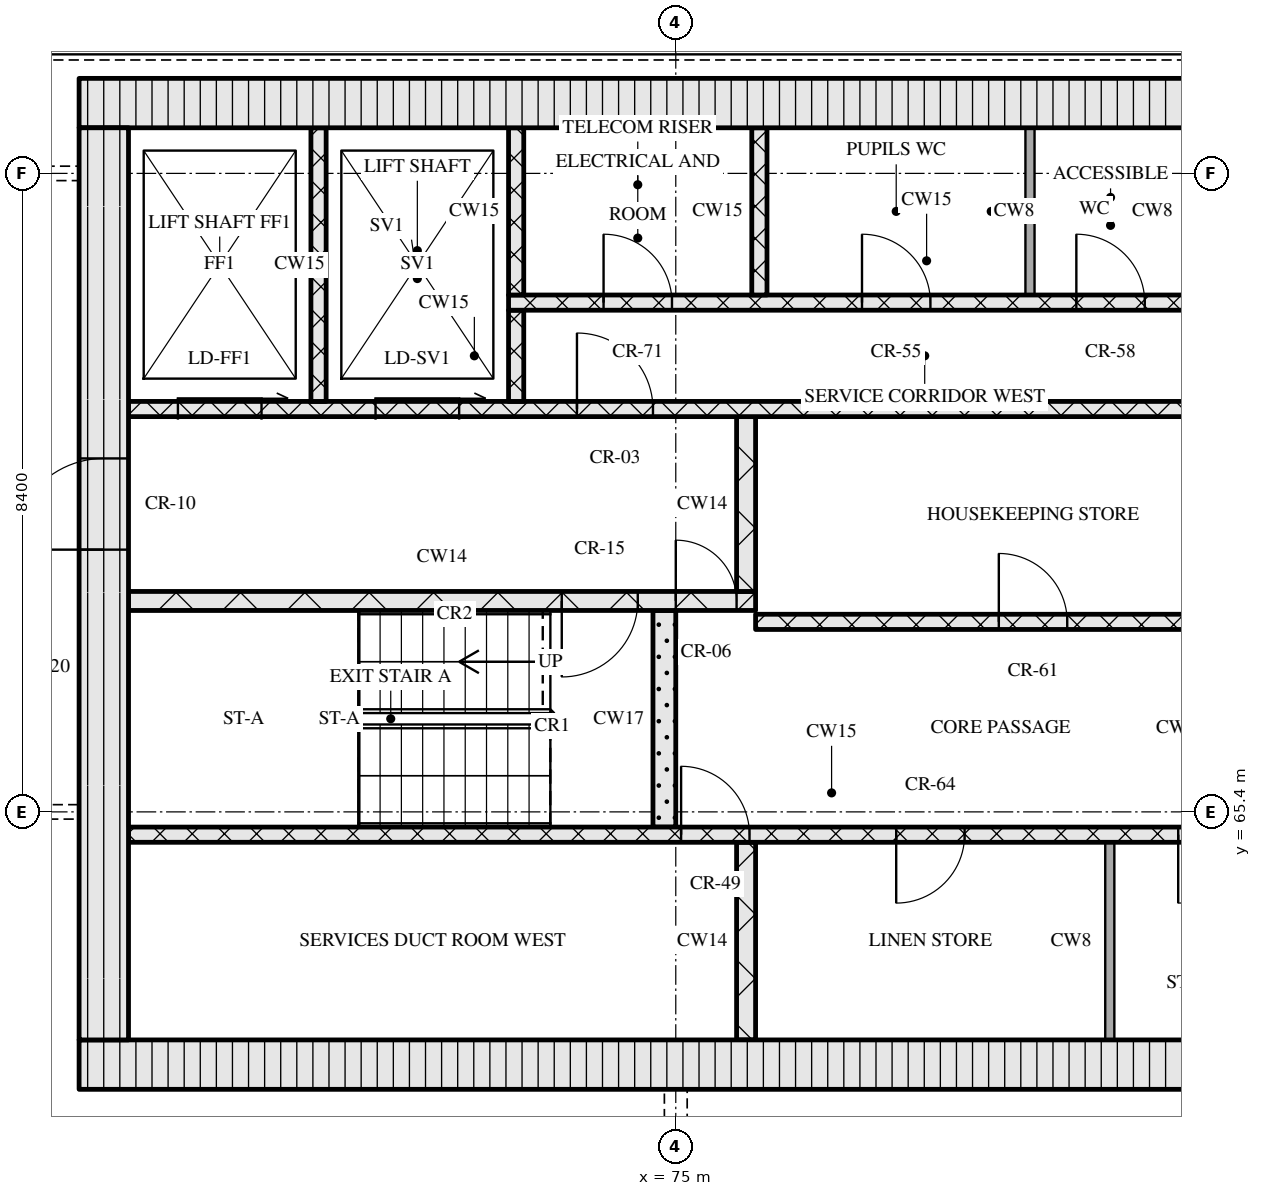
"""IFC4 building model, lengths in metres.
Left out: names, types, materials, properties, quantities, classifications, styles, units other than length and angle.
Written with IfcOpenShell. Run it as: python <this file> out.ifc"""

import sys

from ifc_helpers import new_model, si_unit, direction, frame, frame_2d, origin, place, context, subcontext, project, spatial, rectangle, extrude, element, fill, save


model = new_model("IFC4")
c1 = context("Model", 3, precision=1e-05, world=origin(), true_north=direction((0.0, 1.0)))
c2 = subcontext(c1, "Body", "Model", "MODEL_VIEW")
j1 = project(units=[si_unit("LENGTHUNIT", "METRE"), si_unit("PLANEANGLEUNIT", "RADIAN")], contexts=[c1])
p1 = place(None, origin())
s1 = spatial("IfcSite", under=j1, at=p1, CompositionType="ELEMENT")
p2 = place(p1, origin())
s2 = spatial("IfcBuilding", under=s1, at=p2, CompositionType="ELEMENT")
p3 = place(p2, frame((0.0, 0.0, 216.3)))
s3 = spatial("IfcBuildingStorey", under=s2, at=p3, CompositionType="ELEMENT", Elevation=216.3)
p4 = place(p3, frame((67.15, 62.075, 0.0), z_axis=(0.0, 0.0, 1.0), x_axis=(1.0, 0.0, 0.0)))
e1 = element("IfcWall", 1, at=p4, inside=s3, PredefinedType="SOLIDWALL", context=c2, shape_type="SweptSolid", body=[
    extrude(rectangle(XDim=40.9, YDim=0.65, at=frame_2d((20.45, 0.0))), origin(), (0.0, 0.0, 1.0), 3.32),
])
p5 = place(p4, frame((20.8, 0.0, 0.0)))
e2 = element("IfcOpeningElement", 2, at=p5, cuts=e1, PredefinedType="OPENING", context=c2, shape_type="SweptSolid", body=[
    extrude(rectangle(XDim=1.8, YDim=2.1, at=frame_2d((0.9, 1.05))), frame((0.0, 0.335, 0.0), z_axis=(0.0, -1.0, 0.0), x_axis=(1.0, 0.0, 0.0)), (0.0, 0.0, 1.0), 0.67),
])
p6 = place(p3, frame((67.15, 74.725, 0.0), z_axis=(0.0, 0.0, 1.0), x_axis=(1.0, 0.0, 0.0)))
e3 = element("IfcWall", 3, at=p6, inside=s3, PredefinedType="SOLIDWALL", context=c2, shape_type="SweptSolid", body=[
    extrude(rectangle(XDim=40.9, YDim=0.65, at=frame_2d((20.45, 0.0))), origin(), (0.0, 0.0, 1.0), 3.32),
])
p7 = place(p3, frame((67.475, 62.4, 0.0), z_axis=(0.0, 0.0, 1.0), x_axis=(0.0, 1.0, 0.0)))
e4 = element("IfcWall", 4, at=p7, inside=s3, PredefinedType="SOLIDWALL", context=c2, shape_type="SweptSolid", body=[
    extrude(rectangle(XDim=12.0, YDim=0.65, at=frame_2d((6.0, 0.0))), origin(), (0.0, 0.0, 1.0), 3.32),
])
p8 = place(p7, frame((6.45, 0.0, 0.0)))
e5 = element("IfcOpeningElement", 5, at=p8, cuts=e4, PredefinedType="OPENING", context=c2, shape_type="SweptSolid", body=[
    extrude(rectangle(XDim=1.2, YDim=2.1, at=frame_2d((0.6, 1.05))), frame((0.0, 0.335, 0.0), z_axis=(0.0, -1.0, 0.0), x_axis=(1.0, 0.0, 0.0)), (0.0, 0.0, 1.0), 0.67),
])
p9 = place(p3, frame((75.925, 62.4, 0.0), z_axis=(0.0, 0.0, 1.0), x_axis=(0.0, 1.0, 0.0)))
e6 = element("IfcWall", 6, at=p9, inside=s3, PredefinedType="SOLIDWALL", context=c2, shape_type="SweptSolid", body=[
    extrude(rectangle(XDim=2.6, YDim=0.25, at=frame_2d((1.3, 0.0))), origin(), (0.0, 0.0, 1.0), 3.32),
])
p10 = place(p3, frame((80.71, 62.4, 0.0), z_axis=(0.0, 0.0, 1.0), x_axis=(0.0, 1.0, 0.0)))
e7 = element("IfcWall", 7, at=p10, inside=s3, PredefinedType="PARTITIONING", context=c2, shape_type="SweptSolid", body=[
    extrude(rectangle(XDim=2.6, YDim=0.12, at=frame_2d((1.3, 0.0))), origin(), (0.0, 0.0, 1.0), 3.32),
])
p11 = place(p3, frame((67.8, 65.1, 0.0), z_axis=(0.0, 0.0, 1.0), x_axis=(1.0, 0.0, 0.0)))
e8 = element("IfcWall", 8, at=p11, inside=s3, PredefinedType="SOLIDWALL", context=c2, shape_type="SweptSolid", body=[
    extrude(rectangle(XDim=18.5, YDim=0.2, at=frame_2d((9.25, 0.0))), origin(), (0.0, 0.0, 1.0), 3.32),
])
p12 = place(p11, frame((7.27, 0.0, 0.0)))
e9 = element("IfcOpeningElement", 9, at=p12, cuts=e8, PredefinedType="OPENING", context=c2, shape_type="SweptSolid", body=[
    extrude(rectangle(XDim=0.9, YDim=2.1, at=frame_2d((0.45, 1.05))), frame((0.0, 0.11, 0.0), z_axis=(0.0, -1.0, 0.0), x_axis=(1.0, 0.0, 0.0)), (0.0, 0.0, 1.0), 0.22),
])
p13 = place(p11, frame((10.1, 0.0, 0.0)))
e10 = element("IfcOpeningElement", 10, at=p13, cuts=e8, PredefinedType="OPENING", context=c2, shape_type="SweptSolid", body=[
    extrude(rectangle(XDim=0.9, YDim=2.1, at=frame_2d((0.45, 1.05))), frame((0.0, 0.11, 0.0), z_axis=(0.0, -1.0, 0.0), x_axis=(1.0, 0.0, 0.0)), (0.0, 0.0, 1.0), 0.22),
])
p14 = place(p11, frame((13.81, 0.0, 0.0)))
e11 = element("IfcOpeningElement", 11, at=p14, cuts=e8, PredefinedType="OPENING", context=c2, shape_type="SweptSolid", body=[
    extrude(rectangle(XDim=0.9, YDim=2.1, at=frame_2d((0.45, 1.05))), frame((0.0, 0.11, 0.0), z_axis=(0.0, -1.0, 0.0), x_axis=(1.0, 0.0, 0.0)), (0.0, 0.0, 1.0), 0.22),
])
p15 = place(p11, frame((16.7, 0.0, 0.0)))
e12 = element("IfcOpeningElement", 12, at=p15, cuts=e8, PredefinedType="OPENING", context=c2, shape_type="SweptSolid", body=[
    extrude(rectangle(XDim=0.9, YDim=2.1, at=frame_2d((0.45, 1.05))), frame((0.0, 0.11, 0.0), z_axis=(0.0, -1.0, 0.0), x_axis=(1.0, 0.0, 0.0)), (0.0, 0.0, 1.0), 0.22),
])
p16 = place(p3, frame((74.85, 65.2, 0.0), z_axis=(0.0, 0.0, 1.0), x_axis=(0.0, 1.0, 0.0)))
e13 = element("IfcWall", 13, at=p16, inside=s3, PredefinedType="SOLIDWALL", context=c2, shape_type="SweptSolid", body=[
    extrude(rectangle(XDim=2.85, YDim=0.3, at=frame_2d((1.425, 0.0))), origin(), (0.0, 0.0, 1.0), 3.32),
])
p17 = place(p3, frame((76.05, 67.9, 0.0), z_axis=(0.0, 0.0, 1.0), x_axis=(1.0, 0.0, 0.0)))
e14 = element("IfcWall", 14, at=p17, inside=s3, PredefinedType="SOLIDWALL", context=c2, shape_type="SweptSolid", body=[
    extrude(rectangle(XDim=23.1, YDim=0.2, at=frame_2d((11.55, 0.0))), origin(), (0.0, 0.0, 1.0), 3.32),
])
p18 = place(p17, frame((3.2, 0.0, 0.0)))
e15 = element("IfcOpeningElement", 15, at=p18, cuts=e14, PredefinedType="OPENING", context=c2, shape_type="SweptSolid", body=[
    extrude(rectangle(XDim=0.9, YDim=2.1, at=frame_2d((0.45, 1.05))), frame((0.0, 0.11, 0.0), z_axis=(0.0, -1.0, 0.0), x_axis=(1.0, 0.0, 0.0)), (0.0, 0.0, 1.0), 0.22),
])
p19 = place(p17, frame((9.7, 0.0, 0.0)))
e16 = element("IfcOpeningElement", 16, at=p19, cuts=e14, PredefinedType="OPENING", context=c2, shape_type="SweptSolid", body=[
    extrude(rectangle(XDim=0.9, YDim=2.1, at=frame_2d((0.45, 1.05))), frame((0.0, 0.11, 0.0), z_axis=(0.0, -1.0, 0.0), x_axis=(1.0, 0.0, 0.0)), (0.0, 0.0, 1.0), 0.22),
])
p20 = place(p17, frame((13.55, 0.0, 0.0)))
e17 = element("IfcOpeningElement", 17, at=p20, cuts=e14, PredefinedType="OPENING", context=c2, shape_type="SweptSolid", body=[
    extrude(rectangle(XDim=1.0, YDim=2.1, at=frame_2d((0.5, 1.05))), frame((0.0, 0.11, 0.0), z_axis=(0.0, -1.0, 0.0), x_axis=(1.0, 0.0, 0.0)), (0.0, 0.0, 1.0), 0.22),
])
p21 = place(p17, frame((16.2, 0.0, 0.0)))
e18 = element("IfcOpeningElement", 18, at=p21, cuts=e14, PredefinedType="OPENING", context=c2, shape_type="SweptSolid", body=[
    extrude(rectangle(XDim=1.1, YDim=2.1, at=frame_2d((0.55, 1.05))), frame((0.0, 0.11, 0.0), z_axis=(0.0, -1.0, 0.0), x_axis=(1.0, 0.0, 0.0)), (0.0, 0.0, 1.0), 0.22),
])
p22 = place(p17, frame((18.7, 0.0, 0.0)))
e19 = element("IfcOpeningElement", 19, at=p22, cuts=e14, PredefinedType="OPENING", context=c2, shape_type="SweptSolid", body=[
    extrude(rectangle(XDim=1.1, YDim=2.1, at=frame_2d((0.55, 1.05))), frame((0.0, 0.11, 0.0), z_axis=(0.0, -1.0, 0.0), x_axis=(1.0, 0.0, 0.0)), (0.0, 0.0, 1.0), 0.22),
])
p23 = place(p17, frame((21.2, 0.0, 0.0)))
e20 = element("IfcOpeningElement", 20, at=p23, cuts=e14, PredefinedType="OPENING", context=c2, shape_type="SweptSolid", body=[
    extrude(rectangle(XDim=1.1, YDim=2.1, at=frame_2d((0.55, 1.05))), frame((0.0, 0.11, 0.0), z_axis=(0.0, -1.0, 0.0), x_axis=(1.0, 0.0, 0.0)), (0.0, 0.0, 1.0), 0.22),
])
p24 = place(p3, frame((67.8, 68.175, 0.0), z_axis=(0.0, 0.0, 1.0), x_axis=(1.0, 0.0, 0.0)))
e21 = element("IfcWall", 21, at=p24, inside=s3, PredefinedType="SOLIDWALL", context=c2, shape_type="SweptSolid", body=[
    extrude(rectangle(XDim=8.25, YDim=0.25, at=frame_2d((4.125, 0.0))), origin(), (0.0, 0.0, 1.0), 3.32),
])
p25 = place(p24, frame((5.7, 0.0, 0.0)))
e22 = element("IfcOpeningElement", 22, at=p25, cuts=e21, PredefinedType="OPENING", context=c2, shape_type="SweptSolid", body=[
    extrude(rectangle(XDim=1.0, YDim=2.1, at=frame_2d((0.5, 1.05))), frame((0.0, 0.135, 0.0), z_axis=(0.0, -1.0, 0.0), x_axis=(1.0, 0.0, 0.0)), (0.0, 0.0, 1.0), 0.27),
])
p26 = place(p24, frame((7.2, 0.0, 0.0)))
e23 = element("IfcOpeningElement", 23, at=p26, cuts=e21, PredefinedType="OPENING", context=c2, shape_type="SweptSolid", body=[
    extrude(rectangle(XDim=0.8, YDim=2.1, at=frame_2d((0.4, 1.05))), frame((0.0, 0.135, 0.0), z_axis=(0.0, -1.0, 0.0), x_axis=(1.0, 0.0, 0.0)), (0.0, 0.0, 1.0), 0.27),
])
p27 = place(p3, frame((75.925, 68.3, 0.0), z_axis=(0.0, 0.0, 1.0), x_axis=(0.0, 1.0, 0.0)))
e24 = element("IfcWall", 24, at=p27, inside=s3, PredefinedType="SOLIDWALL", context=c2, shape_type="SweptSolid", body=[
    extrude(rectangle(XDim=2.3, YDim=0.25, at=frame_2d((1.15, 0.0))), origin(), (0.0, 0.0, 1.0), 3.32),
])
p28 = place(p3, frame((67.8, 70.7, 0.0), z_axis=(0.0, 0.0, 1.0), x_axis=(1.0, 0.0, 0.0)))
e25 = element("IfcWall", 25, at=p28, inside=s3, PredefinedType="SOLIDWALL", context=c2, shape_type="SweptSolid", body=[
    extrude(rectangle(XDim=39.6, YDim=0.2, at=frame_2d((19.8, 0.0))), origin(), (0.0, 0.0, 1.0), 3.32),
])
p29 = place(p28, frame((0.65, 0.0, 0.0)))
e26 = element("IfcOpeningElement", 26, at=p29, cuts=e25, PredefinedType="OPENING", context=c2, shape_type="SweptSolid", body=[
    extrude(rectangle(XDim=1.1, YDim=2.1, at=frame_2d((0.55, 1.05))), frame((0.0, 0.11, 0.0), z_axis=(0.0, -1.0, 0.0), x_axis=(1.0, 0.0, 0.0)), (0.0, 0.0, 1.0), 0.22),
])
p30 = place(p28, frame((3.25, 0.0, 0.0)))
e27 = element("IfcOpeningElement", 27, at=p30, cuts=e25, PredefinedType="OPENING", context=c2, shape_type="SweptSolid", body=[
    extrude(rectangle(XDim=1.1, YDim=2.1, at=frame_2d((0.55, 1.05))), frame((0.0, 0.11, 0.0), z_axis=(0.0, -1.0, 0.0), x_axis=(1.0, 0.0, 0.0)), (0.0, 0.0, 1.0), 0.22),
])
p31 = place(p28, frame((5.9, 0.0, 0.0)))
e28 = element("IfcOpeningElement", 28, at=p31, cuts=e25, PredefinedType="OPENING", context=c2, shape_type="SweptSolid", body=[
    extrude(rectangle(XDim=1.0, YDim=2.1, at=frame_2d((0.5, 1.05))), frame((0.0, 0.11, 0.0), z_axis=(0.0, -1.0, 0.0), x_axis=(1.0, 0.0, 0.0)), (0.0, 0.0, 1.0), 0.22),
])
p32 = place(p28, frame((21.7, 0.0, 0.0)))
e29 = element("IfcOpeningElement", 29, at=p32, cuts=e25, PredefinedType="OPENING", context=c2, shape_type="SweptSolid", body=[
    extrude(rectangle(XDim=1.0, YDim=2.1, at=frame_2d((0.5, 1.05))), frame((0.0, 0.11, 0.0), z_axis=(0.0, -1.0, 0.0), x_axis=(1.0, 0.0, 0.0)), (0.0, 0.0, 1.0), 0.22),
])
p33 = place(p28, frame((32.7, 0.0, 0.0)))
e30 = element("IfcOpeningElement", 30, at=p33, cuts=e25, PredefinedType="OPENING", context=c2, shape_type="SweptSolid", body=[
    extrude(rectangle(XDim=1.0, YDim=2.1, at=frame_2d((0.5, 1.05))), frame((0.0, 0.11, 0.0), z_axis=(0.0, -1.0, 0.0), x_axis=(1.0, 0.0, 0.0)), (0.0, 0.0, 1.0), 0.22),
])
p34 = place(p28, frame((35.25, 0.0, 0.0)))
e31 = element("IfcOpeningElement", 31, at=p34, cuts=e25, PredefinedType="OPENING", context=c2, shape_type="SweptSolid", body=[
    extrude(rectangle(XDim=1.1, YDim=2.1, at=frame_2d((0.55, 1.05))), frame((0.0, 0.11, 0.0), z_axis=(0.0, -1.0, 0.0), x_axis=(1.0, 0.0, 0.0)), (0.0, 0.0, 1.0), 0.22),
])
p35 = place(p28, frame((37.85, 0.0, 0.0)))
e32 = element("IfcOpeningElement", 32, at=p35, cuts=e25, PredefinedType="OPENING", context=c2, shape_type="SweptSolid", body=[
    extrude(rectangle(XDim=1.1, YDim=2.1, at=frame_2d((0.55, 1.05))), frame((0.0, 0.11, 0.0), z_axis=(0.0, -1.0, 0.0), x_axis=(1.0, 0.0, 0.0)), (0.0, 0.0, 1.0), 0.22),
])
p36 = place(p3, frame((70.3, 70.8, 0.0), z_axis=(0.0, 0.0, 1.0), x_axis=(0.0, 1.0, 0.0)))
e33 = element("IfcWall", 33, at=p36, inside=s3, PredefinedType="SOLIDWALL", context=c2, shape_type="SweptSolid", body=[
    extrude(rectangle(XDim=3.6, YDim=0.2, at=frame_2d((1.8, 0.0))), origin(), (0.0, 0.0, 1.0), 3.32),
])
p37 = place(p3, frame((72.9, 70.8, 0.0), z_axis=(0.0, 0.0, 1.0), x_axis=(0.0, 1.0, 0.0)))
e34 = element("IfcWall", 34, at=p37, inside=s3, PredefinedType="SOLIDWALL", context=c2, shape_type="SweptSolid", body=[
    extrude(rectangle(XDim=1.2, YDim=0.2, at=frame_2d((0.6, 0.0))), origin(), (0.0, 0.0, 1.0), 3.32),
])
p38 = place(p3, frame((72.8, 72.1, 0.0), z_axis=(0.0, 0.0, 1.0), x_axis=(1.0, 0.0, 0.0)))
e35 = element("IfcWall", 35, at=p38, inside=s3, PredefinedType="SOLIDWALL", context=c2, shape_type="SweptSolid", body=[
    extrude(rectangle(XDim=11.0, YDim=0.2, at=frame_2d((5.5, 0.0))), origin(), (0.0, 0.0, 1.0), 3.32),
])
p39 = place(p38, frame((1.25, 0.0, 0.0)))
e36 = element("IfcOpeningElement", 36, at=p39, cuts=e35, PredefinedType="OPENING", context=c2, shape_type="SweptSolid", body=[
    extrude(rectangle(XDim=0.9, YDim=2.1, at=frame_2d((0.45, 1.05))), frame((0.0, 0.11, 0.0), z_axis=(0.0, -1.0, 0.0), x_axis=(1.0, 0.0, 0.0)), (0.0, 0.0, 1.0), 0.22),
])
p40 = place(p38, frame((4.65, 0.0, 0.0)))
e37 = element("IfcOpeningElement", 37, at=p40, cuts=e35, PredefinedType="OPENING", context=c2, shape_type="SweptSolid", body=[
    extrude(rectangle(XDim=0.9, YDim=2.1, at=frame_2d((0.45, 1.05))), frame((0.0, 0.11, 0.0), z_axis=(0.0, -1.0, 0.0), x_axis=(1.0, 0.0, 0.0)), (0.0, 0.0, 1.0), 0.22),
])
p41 = place(p38, frame((7.47, 0.0, 0.0)))
e38 = element("IfcOpeningElement", 38, at=p41, cuts=e35, PredefinedType="OPENING", context=c2, shape_type="SweptSolid", body=[
    extrude(rectangle(XDim=0.9, YDim=2.1, at=frame_2d((0.45, 1.05))), frame((0.0, 0.11, 0.0), z_axis=(0.0, -1.0, 0.0), x_axis=(1.0, 0.0, 0.0)), (0.0, 0.0, 1.0), 0.22),
])
p42 = place(p38, frame((9.445, 0.0, 0.0)))
e39 = element("IfcOpeningElement", 39, at=p42, cuts=e35, PredefinedType="OPENING", context=c2, shape_type="SweptSolid", body=[
    extrude(rectangle(XDim=0.9, YDim=2.1, at=frame_2d((0.45, 1.05))), frame((0.0, 0.11, 0.0), z_axis=(0.0, -1.0, 0.0), x_axis=(1.0, 0.0, 0.0)), (0.0, 0.0, 1.0), 0.22),
])
for number, where, z_axis, x_axis in (
    (40, (72.9, 72.2, 0.0), (0.0, 0.0, 1.0), (0.0, 1.0, 0.0)),
    (41, (76.1, 72.2, 0.0), (0.0, 0.0, 1.0), (0.0, 1.0, 0.0)),
):
    element("IfcWall", number, at=place(p3, frame(where, z_axis=z_axis, x_axis=x_axis)), inside=s3, PredefinedType="SOLIDWALL", context=c2, shape_type="SweptSolid", body=[
        extrude(rectangle(XDim=2.2, YDim=0.2, at=frame_2d((1.1, 0.0))), origin(), (0.0, 0.0, 1.0), 3.32),
    ])
p43 = place(p3, frame((79.66, 72.2, 0.0), z_axis=(0.0, 0.0, 1.0), x_axis=(0.0, 1.0, 0.0)))
e42 = element("IfcWall", 42, at=p43, inside=s3, PredefinedType="PARTITIONING", context=c2, shape_type="SweptSolid", body=[
    extrude(rectangle(XDim=2.2, YDim=0.12, at=frame_2d((1.1, 0.0))), origin(), (0.0, 0.0, 1.0), 3.32),
])
p44 = place(p12, origin())
e43 = element("IfcDoor", 43, at=p44, inside=s3, OperationType="SINGLE_SWING_LEFT", PredefinedType="DOOR", context=c2, shape_type="SweptSolid", body=[
    extrude(rectangle(XDim=0.9, YDim=2.1, at=frame_2d((0.45, 1.05))), frame((0.0, 0.025, 0.0), z_axis=(0.0, -1.0, 0.0), x_axis=(1.0, 0.0, 0.0)), (0.0, 0.0, 1.0), 0.05),
])
fill(e9, e43)
p45 = place(p13, origin())
e44 = element("IfcDoor", 44, at=p45, inside=s3, OperationType="SINGLE_SWING_RIGHT", PredefinedType="DOOR", context=c2, shape_type="SweptSolid", body=[
    extrude(rectangle(XDim=0.9, YDim=2.1, at=frame_2d((0.45, 1.05))), frame((0.0, 0.025, 0.0), z_axis=(0.0, -1.0, 0.0), x_axis=(1.0, 0.0, 0.0)), (0.0, 0.0, 1.0), 0.05),
])
fill(e10, e44)
p46 = place(p14, origin())
e45 = element("IfcDoor", 45, at=p46, inside=s3, OperationType="SINGLE_SWING_RIGHT", PredefinedType="DOOR", context=c2, shape_type="SweptSolid", body=[
    extrude(rectangle(XDim=0.9, YDim=2.1, at=frame_2d((0.45, 1.05))), frame((0.0, 0.025, 0.0), z_axis=(0.0, -1.0, 0.0), x_axis=(1.0, 0.0, 0.0)), (0.0, 0.0, 1.0), 0.05),
])
fill(e11, e45)
p47 = place(p18, origin())
e46 = element("IfcDoor", 46, at=p47, inside=s3, OperationType="SINGLE_SWING_LEFT", PredefinedType="DOOR", context=c2, shape_type="SweptSolid", body=[
    extrude(rectangle(XDim=0.9, YDim=2.1, at=frame_2d((0.45, 1.05))), frame((0.0, 0.025, 0.0), z_axis=(0.0, -1.0, 0.0), x_axis=(1.0, 0.0, 0.0)), (0.0, 0.0, 1.0), 0.05),
])
fill(e15, e46)
p48 = place(p25, origin())
e47 = element("IfcDoor", 47, at=p48, inside=s3, OperationType="SINGLE_SWING_RIGHT", PredefinedType="DOOR", context=c2, shape_type="SweptSolid", body=[
    extrude(rectangle(XDim=1.0, YDim=2.1, at=frame_2d((0.5, 1.05))), frame((0.0, 0.025, 0.0), z_axis=(0.0, -1.0, 0.0), x_axis=(1.0, 0.0, 0.0)), (0.0, 0.0, 1.0), 0.05),
])
fill(e22, e47)
p49 = place(p26, origin())
e48 = element("IfcDoor", 48, at=p49, inside=s3, OperationType="SINGLE_SWING_LEFT", PredefinedType="DOOR", context=c2, shape_type="SweptSolid", body=[
    extrude(rectangle(XDim=0.8, YDim=2.1, at=frame_2d((0.4, 1.05))), frame((0.0, 0.025, 0.0), z_axis=(0.0, -1.0, 0.0), x_axis=(1.0, 0.0, 0.0)), (0.0, 0.0, 1.0), 0.05),
])
fill(e23, e48)
p50 = place(p8, origin())
e49 = element("IfcDoor", 49, at=p50, inside=s3, OperationType="SINGLE_SWING_LEFT", PredefinedType="DOOR", context=c2, shape_type="SweptSolid", body=[
    extrude(rectangle(XDim=1.2, YDim=2.1, at=frame_2d((0.6, 1.05))), frame((0.0, 0.025, 0.0), z_axis=(0.0, -1.0, 0.0), x_axis=(1.0, 0.0, 0.0)), (0.0, 0.0, 1.0), 0.05),
])
fill(e5, e49)
p51 = place(p29, origin())
e50 = element("IfcDoor", 50, at=p51, inside=s3, OperationType="SLIDING_TO_RIGHT", PredefinedType="DOOR", context=c2, shape_type="SweptSolid", body=[
    extrude(rectangle(XDim=1.1, YDim=2.1, at=frame_2d((0.55, 1.05))), frame((0.0, 0.025, 0.0), z_axis=(0.0, -1.0, 0.0), x_axis=(1.0, 0.0, 0.0)), (0.0, 0.0, 1.0), 0.05),
])
fill(e26, e50)
p52 = place(p30, origin())
e51 = element("IfcDoor", 51, at=p52, inside=s3, OperationType="SLIDING_TO_RIGHT", PredefinedType="DOOR", context=c2, shape_type="SweptSolid", body=[
    extrude(rectangle(XDim=1.1, YDim=2.1, at=frame_2d((0.55, 1.05))), frame((0.0, 0.025, 0.0), z_axis=(0.0, -1.0, 0.0), x_axis=(1.0, 0.0, 0.0)), (0.0, 0.0, 1.0), 0.05),
])
fill(e27, e51)
p53 = place(p31, origin())
e52 = element("IfcDoor", 52, at=p53, inside=s3, OperationType="SINGLE_SWING_LEFT", PredefinedType="DOOR", context=c2, shape_type="SweptSolid", body=[
    extrude(rectangle(XDim=1.0, YDim=2.1, at=frame_2d((0.5, 1.05))), frame((0.0, 0.025, 0.0), z_axis=(0.0, -1.0, 0.0), x_axis=(1.0, 0.0, 0.0)), (0.0, 0.0, 1.0), 0.05),
])
fill(e28, e52)
p54 = place(p39, origin())
e53 = element("IfcDoor", 53, at=p54, inside=s3, OperationType="SINGLE_SWING_LEFT", PredefinedType="DOOR", context=c2, shape_type="SweptSolid", body=[
    extrude(rectangle(XDim=0.9, YDim=2.1, at=frame_2d((0.45, 1.05))), frame((0.0, 0.025, 0.0), z_axis=(0.0, -1.0, 0.0), x_axis=(1.0, 0.0, 0.0)), (0.0, 0.0, 1.0), 0.05),
])
fill(e36, e53)
p55 = place(p40, origin())
e54 = element("IfcDoor", 54, at=p55, inside=s3, OperationType="SINGLE_SWING_LEFT", PredefinedType="DOOR", context=c2, shape_type="SweptSolid", body=[
    extrude(rectangle(XDim=0.9, YDim=2.1, at=frame_2d((0.45, 1.05))), frame((0.0, 0.025, 0.0), z_axis=(0.0, -1.0, 0.0), x_axis=(1.0, 0.0, 0.0)), (0.0, 0.0, 1.0), 0.05),
])
fill(e37, e54)
p56 = place(p41, origin())
e55 = element("IfcDoor", 55, at=p56, inside=s3, OperationType="SINGLE_SWING_LEFT", PredefinedType="DOOR", context=c2, shape_type="SweptSolid", body=[
    extrude(rectangle(XDim=0.9, YDim=2.1, at=frame_2d((0.45, 1.05))), frame((0.0, 0.025, 0.0), z_axis=(0.0, -1.0, 0.0), x_axis=(1.0, 0.0, 0.0)), (0.0, 0.0, 1.0), 0.05),
])
fill(e38, e55)
save(model, sys.argv[1])
